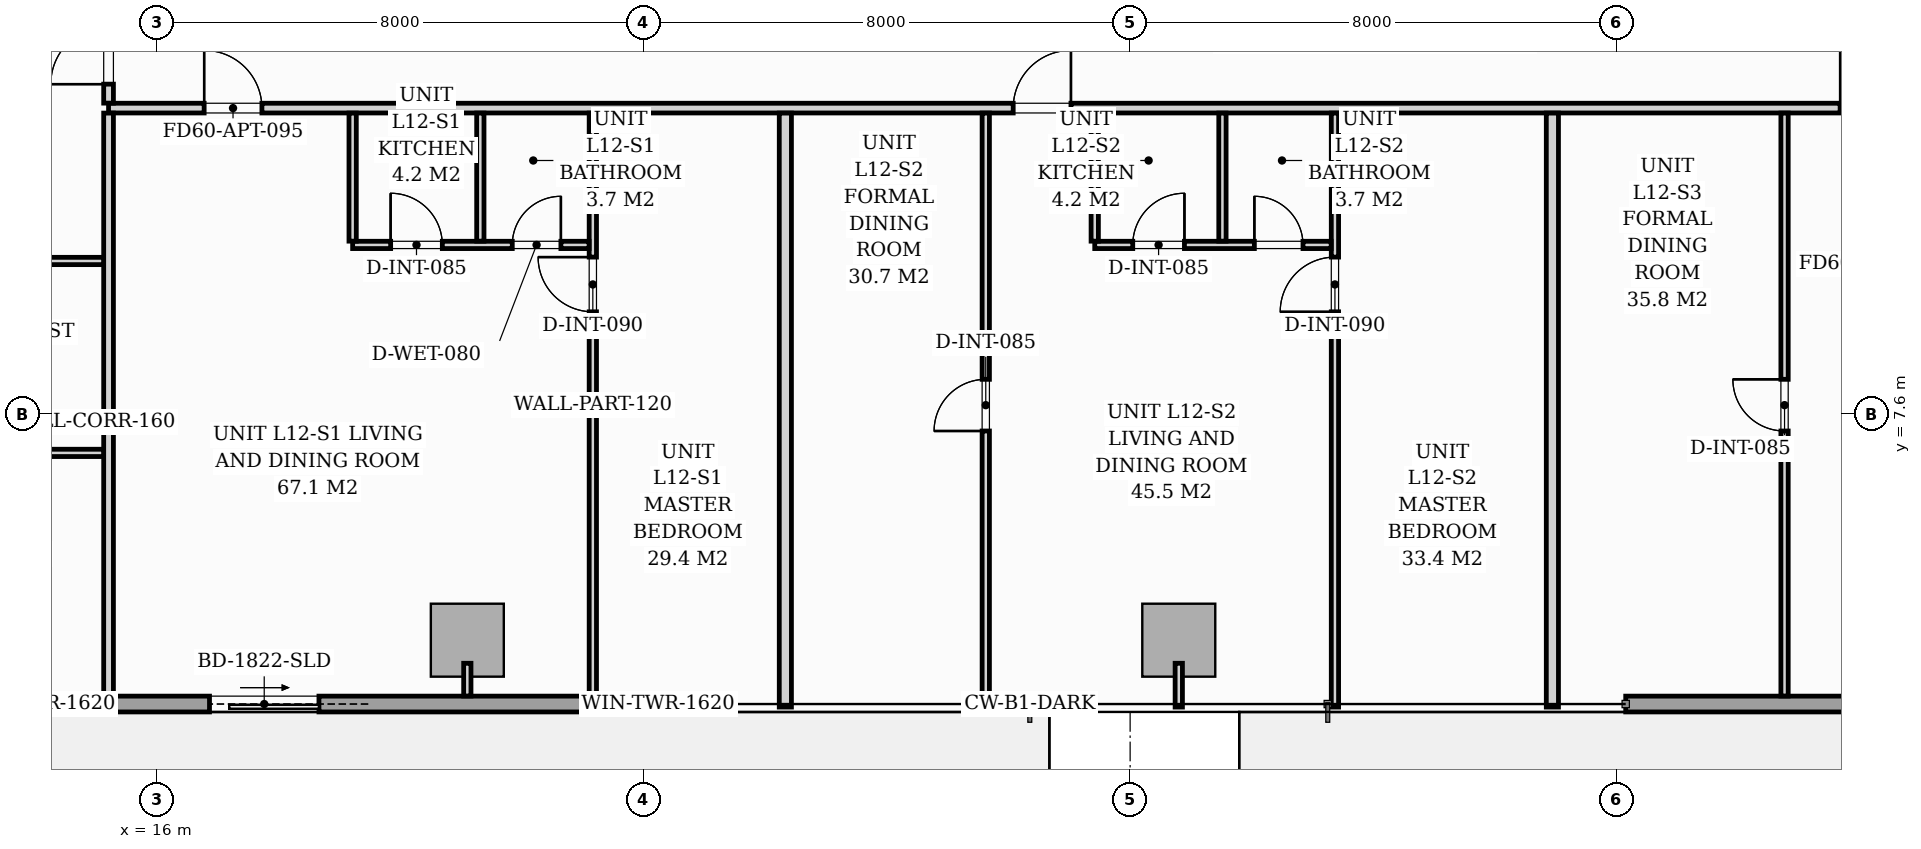
"""IFC4 building model, lengths in metres.
Left out: names, types, materials, properties, quantities, classifications, styles, units other than length and angle.
Written with IfcOpenShell. Run it as: python <this file> out.ifc"""

import sys

from ifc_helpers import new_model, si_unit, direction, frame, frame_2d, origin, origin_2d, place, context, subcontext, project, spatial, rectangle, extrude, source, transform, mapped, element, fill, save


model = new_model("IFC4")
c1 = context("Model", 3, precision=1e-05, world=origin(), true_north=direction((0.0, 1.0)))
c2 = subcontext(c1, "Body", "Model", "MODEL_VIEW")
j1 = project(units=[si_unit("LENGTHUNIT", "METRE"), si_unit("PLANEANGLEUNIT", "RADIAN")], contexts=[c1])
p1 = place(None, origin())
s1 = spatial("IfcSite", under=j1, at=p1, CompositionType="ELEMENT")
p2 = place(p1, origin())
s2 = spatial("IfcBuilding", under=s1, at=p2, CompositionType="ELEMENT")
p3 = place(p2, frame((0.0, 0.0, 45.4)))
s3 = spatial("IfcBuildingStorey", under=s2, at=p3, CompositionType="ELEMENT", Elevation=45.4)
m1 = source(origin(), c2, "Body", "SweptSolid", [
    extrude(rectangle(XDim=1.2, YDim=1.2, at=origin_2d()), origin(), (0.0, 0.0, 1.0), 3.196),
])
for number, where, z_axis, x_axis in (
    (1, (21.1, 3.88, 0.002), (0.0, 0.0, 1.0), (1.0, 0.0, 0.0)),
    (2, (32.8, 3.88, 0.002), (0.0, 0.0, 1.0), (1.0, 0.0, 0.0)),
):
    element("IfcColumn", number, at=place(p3, frame(where, z_axis=z_axis, x_axis=x_axis)), inside=s3, PredefinedType="COLUMN", context=c2, shape_type="MappedRepresentation", body=[
        mapped(m1, transform((0.0, 0.0, 0.0), scale=1.0)),
    ])
p4 = place(p3, frame((57.3, 2.83, 0.0), z_axis=(0.0, 0.0, 1.0), x_axis=(-1.0, 0.0, 0.0)))
e3 = element("IfcWall", 3, at=p4, inside=s3, PredefinedType="STANDARD", context=c2, shape_type="SweptSolid", body=[
    extrude(rectangle(XDim=17.15, YDim=0.26, at=frame_2d((8.575, 0.0))), origin(), (0.0, 0.0, 1.0), 2.94),
])
p5 = place(p4, frame((8.177, 0.0, 0.0)))
e4 = element("IfcOpeningElement", 4, at=p5, cuts=e3, PredefinedType="OPENING", context=c2, shape_type="SweptSolid", body=[
    extrude(rectangle(XDim=1.8, YDim=2.06, at=frame_2d((0.9, 1.03))), frame((0.0, 0.14, 0.0), z_axis=(0.0, -1.0, 0.0), x_axis=(1.0, 0.0, 0.0)), (0.0, 0.0, 1.0), 0.28),
])
p6 = place(p4, frame((2.05, 0.0, 0.65)))
e5 = element("IfcOpeningElement", 5, at=p6, cuts=e3, PredefinedType="OPENING", context=c2, shape_type="SweptSolid", body=[
    extrude(rectangle(XDim=1.6, YDim=1.5, at=frame_2d((0.8, 0.75))), frame((0.0, 0.14, 0.0), z_axis=(0.0, -1.0, 0.0), x_axis=(1.0, 0.0, 0.0)), (0.0, 0.0, 1.0), 0.28),
])
p7 = place(p4, frame((5.644, 0.0, 0.75)))
e6 = element("IfcOpeningElement", 6, at=p7, cuts=e3, PredefinedType="OPENING", context=c2, shape_type="SweptSolid", body=[
    extrude(rectangle(XDim=1.6, YDim=1.5, at=frame_2d((0.8, 0.75))), frame((0.0, 0.14, 0.0), z_axis=(0.0, -1.0, 0.0), x_axis=(1.0, 0.0, 0.0)), (0.0, 0.0, 1.0), 0.28),
])
p8 = place(p3, frame((25.45, 2.83, 0.0), z_axis=(0.0, 0.0, 1.0), x_axis=(-1.0, 0.0, 0.0)))
e7 = element("IfcWall", 7, at=p8, inside=s3, PredefinedType="STANDARD", context=c2, shape_type="SweptSolid", body=[
    extrude(rectangle(XDim=17.15, YDim=0.26, at=frame_2d((8.575, 0.0))), origin(), (0.0, 0.0, 1.0), 2.94),
])
p9 = place(p8, frame((6.79, 0.0, 0.0)))
e8 = element("IfcOpeningElement", 8, at=p9, cuts=e7, PredefinedType="OPENING", context=c2, shape_type="SweptSolid", body=[
    extrude(rectangle(XDim=1.8, YDim=2.06, at=frame_2d((0.9, 1.03))), frame((0.0, 0.14, 0.0), z_axis=(0.0, -1.0, 0.0), x_axis=(1.0, 0.0, 0.0)), (0.0, 0.0, 1.0), 0.28),
])
p10 = place(p8, frame((10.6, 0.0, 0.65)))
e9 = element("IfcOpeningElement", 9, at=p10, cuts=e7, PredefinedType="OPENING", context=c2, shape_type="SweptSolid", body=[
    extrude(rectangle(XDim=1.6, YDim=1.5, at=frame_2d((0.8, 0.75))), frame((0.0, 0.14, 0.0), z_axis=(0.0, -1.0, 0.0), x_axis=(1.0, 0.0, 0.0)), (0.0, 0.0, 1.0), 0.28),
])
p11 = place(p8, frame((0.413, 0.0, 0.75)))
e10 = element("IfcOpeningElement", 10, at=p11, cuts=e7, PredefinedType="OPENING", context=c2, shape_type="SweptSolid", body=[
    extrude(rectangle(XDim=1.6, YDim=1.5, at=frame_2d((0.8, 0.75))), frame((0.0, 0.14, 0.0), z_axis=(0.0, -1.0, 0.0), x_axis=(1.0, 0.0, 0.0)), (0.0, 0.0, 1.0), 0.28),
])
p12 = place(p3, frame((15.2, 12.63, 0.0), z_axis=(0.0, 0.0, 1.0), x_axis=(1.0, 0.0, 0.0)))
e11 = element("IfcWall", 11, at=p12, inside=s3, PredefinedType="PARTITIONING", context=c2, shape_type="SweptSolid", body=[
    extrude(rectangle(XDim=37.1, YDim=0.16, at=frame_2d((18.55, 0.0))), origin(), (0.0, 0.0, 1.0), 2.94),
])
p13 = place(p12, frame((1.572, 0.0, 0.0)))
e12 = element("IfcOpeningElement", 12, at=p13, cuts=e11, PredefinedType="OPENING", context=c2, shape_type="SweptSolid", body=[
    extrude(rectangle(XDim=0.95, YDim=2.06, at=frame_2d((0.475, 1.03))), frame((0.0, 0.09, 0.0), z_axis=(0.0, -1.0, 0.0), x_axis=(1.0, 0.0, 0.0)), (0.0, 0.0, 1.0), 0.18),
])
p14 = place(p12, frame((14.877, 0.0, 0.0)))
e13 = element("IfcOpeningElement", 13, at=p14, cuts=e11, PredefinedType="OPENING", context=c2, shape_type="SweptSolid", body=[
    extrude(rectangle(XDim=0.95, YDim=2.06, at=frame_2d((0.475, 1.03))), frame((0.0, 0.09, 0.0), z_axis=(0.0, -1.0, 0.0), x_axis=(1.0, 0.0, 0.0)), (0.0, 0.0, 1.0), 0.18),
])
p15 = place(p12, frame((28.476, 0.0, 0.0)))
e14 = element("IfcOpeningElement", 14, at=p15, cuts=e11, PredefinedType="OPENING", context=c2, shape_type="SweptSolid", body=[
    extrude(rectangle(XDim=0.95, YDim=2.06, at=frame_2d((0.475, 1.03))), frame((0.0, 0.09, 0.0), z_axis=(0.0, -1.0, 0.0), x_axis=(1.0, 0.0, 0.0)), (0.0, 0.0, 1.0), 0.18),
])
p16 = place(p3, frame((15.2, 2.962, 0.0), z_axis=(0.0, 0.0, 1.0), x_axis=(0.0, 1.0, 0.0)))
e15 = element("IfcWall", 15, at=p16, inside=s3, PredefinedType="PARTITIONING", context=c2, shape_type="SweptSolid", body=[
    extrude(rectangle(XDim=9.586, YDim=0.16, at=frame_2d((4.793, 0.0))), origin(), (0.0, 0.0, 1.0), 2.94),
])
p17 = place(p3, frame((15.2, 12.712, 0.0), z_axis=(0.0, 0.0, 1.0), x_axis=(0.0, 1.0, 0.0)))
e16 = element("IfcWall", 16, at=p17, inside=s3, PredefinedType="PARTITIONING", context=c2, shape_type="SweptSolid", body=[
    extrude(rectangle(XDim=14.726, YDim=0.16, at=frame_2d((7.363, 0.0))), origin(), (0.0, 0.0, 1.0), 2.94),
])
p18 = place(p17, frame((0.312, 0.0, 0.0)))
e17 = element("IfcOpeningElement", 17, at=p18, cuts=e16, PredefinedType="OPENING", context=c2, shape_type="SweptSolid", body=[
    extrude(rectangle(XDim=0.95, YDim=2.06, at=frame_2d((0.475, 1.03))), frame((0.0, 0.09, 0.0), z_axis=(0.0, -1.0, 0.0), x_axis=(1.0, 0.0, 0.0)), (0.0, 0.0, 1.0), 0.18),
])
p19 = place(p3, frame((23.164, 2.962, 0.0), z_axis=(0.0, 0.0, 1.0), x_axis=(0.0, 1.0, 0.0)))
e18 = element("IfcWall", 18, at=p19, inside=s3, PredefinedType="PARTITIONING", context=c2, shape_type="SweptSolid", body=[
    extrude(rectangle(XDim=9.586, YDim=0.12, at=frame_2d((4.793, 0.0))), origin(), (0.0, 0.0, 1.0), 2.94),
])
p20 = place(p19, frame((6.318, 0.0, 0.0)))
e19 = element("IfcOpeningElement", 19, at=p20, cuts=e18, PredefinedType="OPENING", context=c2, shape_type="SweptSolid", body=[
    extrude(rectangle(XDim=0.9, YDim=2.05, at=frame_2d((0.45, 1.025))), frame((0.0, 0.07, 0.0), z_axis=(0.0, -1.0, 0.0), x_axis=(1.0, 0.0, 0.0)), (0.0, 0.0, 1.0), 0.14),
])
p21 = place(p3, frame((19.214, 10.38, 0.0), z_axis=(0.0, 0.0, 1.0), x_axis=(1.0, 0.0, 0.0)))
e20 = element("IfcWall", 20, at=p21, inside=s3, PredefinedType="PARTITIONING", context=c2, shape_type="SweptSolid", body=[
    extrude(rectangle(XDim=3.888, YDim=0.12, at=frame_2d((1.944, 0.0))), origin(), (0.0, 0.0, 1.0), 2.94),
])
p22 = place(p21, frame((0.625, 0.0, 0.0)))
e21 = element("IfcOpeningElement", 21, at=p22, cuts=e20, PredefinedType="OPENING", context=c2, shape_type="SweptSolid", body=[
    extrude(rectangle(XDim=0.85, YDim=2.05, at=frame_2d((0.425, 1.025))), frame((0.0, 0.07, 0.0), z_axis=(0.0, -1.0, 0.0), x_axis=(1.0, 0.0, 0.0)), (0.0, 0.0, 1.0), 0.14),
])
p23 = place(p21, frame((2.625, 0.0, 0.0)))
e22 = element("IfcOpeningElement", 22, at=p23, cuts=e20, PredefinedType="OPENING", context=c2, shape_type="SweptSolid", body=[
    extrude(rectangle(XDim=0.8, YDim=2.02, at=frame_2d((0.4, 1.01))), frame((0.0, 0.07, 0.0), z_axis=(0.0, -1.0, 0.0), x_axis=(1.0, 0.0, 0.0)), (0.0, 0.0, 1.0), 0.14),
])
for number, where, z_axis, x_axis in (
    (23, (21.314, 10.442, 0.0), (0.0, 0.0, 1.0), (0.0, 1.0, 0.0)),
    (24, (19.214, 10.442, 0.0), (0.0, 0.0, 1.0), (0.0, 1.0, 0.0)),
):
    element("IfcWall", number, at=place(p3, frame(where, z_axis=z_axis, x_axis=x_axis)), inside=s3, PredefinedType="PARTITIONING", context=c2, shape_type="SweptSolid", body=[
        extrude(rectangle(XDim=2.106, YDim=0.12, at=frame_2d((1.053, 0.0))), origin(), (0.0, 0.0, 1.0), 2.94),
    ])
p24 = place(p3, frame((26.33, 2.78, 0.0), z_axis=(0.0, 0.0, 1.0), x_axis=(0.0, 1.0, 0.0)))
e25 = element("IfcWall", 25, at=p24, inside=s3, PredefinedType="PARTITIONING", context=c2, shape_type="SweptSolid", body=[
    extrude(rectangle(XDim=9.768, YDim=0.2, at=frame_2d((4.884, 0.0))), origin(), (0.0, 0.0, 1.0), 2.94),
])
p25 = place(p3, frame((35.368, 2.78, 0.0), z_axis=(0.0, 0.0, 1.0), x_axis=(0.0, 1.0, 0.0)))
e26 = element("IfcWall", 26, at=p25, inside=s3, PredefinedType="PARTITIONING", context=c2, shape_type="SweptSolid", body=[
    extrude(rectangle(XDim=9.768, YDim=0.12, at=frame_2d((4.884, 0.0))), origin(), (0.0, 0.0, 1.0), 2.94),
])
p26 = place(p25, frame((6.5, 0.0, 0.0)))
e27 = element("IfcOpeningElement", 27, at=p26, cuts=e26, PredefinedType="OPENING", context=c2, shape_type="SweptSolid", body=[
    extrude(rectangle(XDim=0.9, YDim=2.05, at=frame_2d((0.45, 1.025))), frame((0.0, 0.07, 0.0), z_axis=(0.0, -1.0, 0.0), x_axis=(1.0, 0.0, 0.0)), (0.0, 0.0, 1.0), 0.14),
])
p27 = place(p3, frame((31.418, 10.38, 0.0), z_axis=(0.0, 0.0, 1.0), x_axis=(1.0, 0.0, 0.0)))
e28 = element("IfcWall", 28, at=p27, inside=s3, PredefinedType="PARTITIONING", context=c2, shape_type="SweptSolid", body=[
    extrude(rectangle(XDim=3.888, YDim=0.12, at=frame_2d((1.944, 0.0))), origin(), (0.0, 0.0, 1.0), 2.94),
])
p28 = place(p27, frame((0.625, 0.0, 0.0)))
e29 = element("IfcOpeningElement", 29, at=p28, cuts=e28, PredefinedType="OPENING", context=c2, shape_type="SweptSolid", body=[
    extrude(rectangle(XDim=0.85, YDim=2.05, at=frame_2d((0.425, 1.025))), frame((0.0, 0.07, 0.0), z_axis=(0.0, -1.0, 0.0), x_axis=(1.0, 0.0, 0.0)), (0.0, 0.0, 1.0), 0.14),
])
p29 = place(p27, frame((2.625, 0.0, 0.0)))
e30 = element("IfcOpeningElement", 30, at=p29, cuts=e28, PredefinedType="OPENING", context=c2, shape_type="SweptSolid", body=[
    extrude(rectangle(XDim=0.8, YDim=2.02, at=frame_2d((0.4, 1.01))), frame((0.0, 0.07, 0.0), z_axis=(0.0, -1.0, 0.0), x_axis=(1.0, 0.0, 0.0)), (0.0, 0.0, 1.0), 0.14),
])
for number, where, z_axis, x_axis in (
    (31, (33.518, 10.442, 0.0), (0.0, 0.0, 1.0), (0.0, 1.0, 0.0)),
    (32, (31.418, 10.442, 0.0), (0.0, 0.0, 1.0), (0.0, 1.0, 0.0)),
):
    element("IfcWall", number, at=place(p3, frame(where, z_axis=z_axis, x_axis=x_axis)), inside=s3, PredefinedType="PARTITIONING", context=c2, shape_type="SweptSolid", body=[
        extrude(rectangle(XDim=2.106, YDim=0.12, at=frame_2d((1.053, 0.0))), origin(), (0.0, 0.0, 1.0), 2.94),
    ])
p30 = place(p3, frame((29.626, 2.78, 0.0), z_axis=(0.0, 0.0, 1.0), x_axis=(0.0, 1.0, 0.0)))
e33 = element("IfcWall", 33, at=p30, inside=s3, PredefinedType="PARTITIONING", context=c2, shape_type="SweptSolid", body=[
    extrude(rectangle(XDim=9.768, YDim=0.12, at=frame_2d((4.884, 0.0))), origin(), (0.0, 0.0, 1.0), 2.94),
])
p31 = place(p30, frame((4.54, 0.0, 0.0)))
e34 = element("IfcOpeningElement", 34, at=p31, cuts=e33, PredefinedType="OPENING", context=c2, shape_type="SweptSolid", body=[
    extrude(rectangle(XDim=0.85, YDim=2.05, at=frame_2d((0.425, 1.025))), frame((0.0, 0.07, 0.0), z_axis=(0.0, -1.0, 0.0), x_axis=(1.0, 0.0, 0.0)), (0.0, 0.0, 1.0), 0.14),
])
p32 = place(p3, frame((38.944, 2.78, 0.0), z_axis=(0.0, 0.0, 1.0), x_axis=(0.0, 1.0, 0.0)))
e35 = element("IfcWall", 35, at=p32, inside=s3, PredefinedType="PARTITIONING", context=c2, shape_type="SweptSolid", body=[
    extrude(rectangle(XDim=9.768, YDim=0.2, at=frame_2d((4.884, 0.0))), origin(), (0.0, 0.0, 1.0), 2.94),
])
p33 = place(p3, frame((42.762, 2.962, 0.0), z_axis=(0.0, 0.0, 1.0), x_axis=(0.0, 1.0, 0.0)))
e36 = element("IfcWall", 36, at=p33, inside=s3, PredefinedType="PARTITIONING", context=c2, shape_type="SweptSolid", body=[
    extrude(rectangle(XDim=9.586, YDim=0.12, at=frame_2d((4.793, 0.0))), origin(), (0.0, 0.0, 1.0), 2.94),
])
p34 = place(p33, frame((4.358, 0.0, 0.0)))
e37 = element("IfcOpeningElement", 37, at=p34, cuts=e36, PredefinedType="OPENING", context=c2, shape_type="SweptSolid", body=[
    extrude(rectangle(XDim=0.85, YDim=2.05, at=frame_2d((0.425, 1.025))), frame((0.0, 0.07, 0.0), z_axis=(0.0, -1.0, 0.0), x_axis=(1.0, 0.0, 0.0)), (0.0, 0.0, 1.0), 0.14),
])
p35 = place(p3, frame((5.88, 6.96, 0.0), z_axis=(0.0, 0.0, 1.0), x_axis=(1.0, 0.0, 0.0)))
e38 = element("IfcWall", 38, at=p35, inside=s3, PredefinedType="PARTITIONING", context=c2, shape_type="SweptSolid", body=[
    extrude(rectangle(XDim=9.238, YDim=0.12, at=frame_2d((4.619, 0.0))), origin(), (0.0, 0.0, 1.0), 2.94),
])
p36 = place(p35, frame((4.185, 0.0, 0.0)))
e39 = element("IfcOpeningElement", 39, at=p36, cuts=e38, PredefinedType="OPENING", context=c2, shape_type="SweptSolid", body=[
    extrude(rectangle(XDim=0.85, YDim=2.05, at=frame_2d((0.425, 1.025))), frame((0.0, 0.07, 0.0), z_axis=(0.0, -1.0, 0.0), x_axis=(1.0, 0.0, 0.0)), (0.0, 0.0, 1.0), 0.14),
])
p37 = place(p3, frame((5.88, 10.116, 0.0), z_axis=(0.0, 0.0, 1.0), x_axis=(1.0, 0.0, 0.0)))
e40 = element("IfcWall", 40, at=p37, inside=s3, PredefinedType="PARTITIONING", context=c2, shape_type="SweptSolid", body=[
    extrude(rectangle(XDim=9.238, YDim=0.12, at=frame_2d((4.619, 0.0))), origin(), (0.0, 0.0, 1.0), 2.94),
])
p38 = place(p37, frame((4.185, 0.0, 0.0)))
e41 = element("IfcOpeningElement", 41, at=p38, cuts=e40, PredefinedType="OPENING", context=c2, shape_type="SweptSolid", body=[
    extrude(rectangle(XDim=0.85, YDim=2.05, at=frame_2d((0.425, 1.025))), frame((0.0, 0.07, 0.0), z_axis=(0.0, -1.0, 0.0), x_axis=(1.0, 0.0, 0.0)), (0.0, 0.0, 1.0), 0.14),
])
p39 = place(p3, frame((21.1, 3.5, 0.0), z_axis=(0.0, 0.0, 1.0), x_axis=(0.0, -1.0, 0.0)))
e42 = element("IfcWall", 42, at=p39, inside=s3, PredefinedType="PARTITIONING", context=c2, shape_type="SweptSolid", body=[
    extrude(rectangle(XDim=0.538, YDim=0.12, at=frame_2d((0.269, 0.0))), origin(), (0.0, 0.0, 1.0), 2.94),
])
p40 = place(p3, frame((32.8, 3.5, 0.0), z_axis=(0.0, 0.0, 1.0), x_axis=(0.0, -1.0, 0.0)))
e43 = element("IfcWall", 43, at=p40, inside=s3, PredefinedType="PARTITIONING", context=c2, shape_type="SweptSolid", body=[
    extrude(rectangle(XDim=0.72, YDim=0.12, at=frame_2d((0.36, 0.0))), origin(), (0.0, 0.0, 1.0), 2.94),
])
m2 = source(origin(), c2, "Body", "SweptSolid", [
    extrude(rectangle(XDim=1.8, YDim=2.06, at=frame_2d((0.9, 1.03))), frame((0.0, 0.025, 0.0), z_axis=(0.0, -1.0, 0.0), x_axis=(1.0, 0.0, 0.0)), (0.0, 0.0, 1.0), 0.05),
])
p41 = place(p9, origin())
e44 = element("IfcDoor", 44, at=p41, inside=s3, OperationType="SLIDING_TO_LEFT", PredefinedType="DOOR", context=c2, shape_type="MappedRepresentation", body=[
    mapped(m2, transform((0.0, 0.0, 0.0), scale=1.0)),
])
fill(e8, e44)
m3 = source(origin(), c2, "Body", "SweptSolid", [
    extrude(rectangle(XDim=1.6, YDim=1.5, at=frame_2d((0.8, 0.75))), frame((0.0, 0.03, 0.0), z_axis=(0.0, -1.0, 0.0), x_axis=(1.0, 0.0, 0.0)), (0.0, 0.0, 1.0), 0.06),
])
p42 = place(p10, origin())
e45 = element("IfcWindow", 45, at=p42, inside=s3, PartitioningType="SINGLE_PANEL", PredefinedType="WINDOW", context=c2, shape_type="MappedRepresentation", body=[
    mapped(m3, transform((0.0, 0.0, 0.0), scale=1.0)),
])
fill(e9, e45)
p43 = place(p11, origin())
e46 = element("IfcWindow", 46, at=p43, inside=s3, PartitioningType="SINGLE_PANEL", PredefinedType="WINDOW", context=c2, shape_type="MappedRepresentation", body=[
    mapped(m3, transform((0.0, 0.0, 0.0), scale=1.0)),
])
fill(e10, e46)
m4 = source(origin(), c2, "Body", "SweptSolid", [
    extrude(rectangle(XDim=0.95, YDim=2.06, at=frame_2d((0.475, 1.03))), frame((0.0, 0.025, 0.0), z_axis=(0.0, -1.0, 0.0), x_axis=(1.0, 0.0, 0.0)), (0.0, 0.0, 1.0), 0.05),
])
p44 = place(p13, origin())
e47 = element("IfcDoor", 47, at=p44, inside=s3, OperationType="SINGLE_SWING_LEFT", PredefinedType="DOOR", context=c2, shape_type="MappedRepresentation", body=[
    mapped(m4, transform((0.0, 0.0, 0.0), scale=1.0)),
])
fill(e12, e47)
m5 = source(origin(), c2, "Body", "SweptSolid", [
    extrude(rectangle(XDim=0.9, YDim=2.05, at=frame_2d((0.45, 1.025))), frame((0.0, 0.025, 0.0), z_axis=(0.0, -1.0, 0.0), x_axis=(1.0, 0.0, 0.0)), (0.0, 0.0, 1.0), 0.05),
])
p45 = place(p20, origin())
e48 = element("IfcDoor", 48, at=p45, inside=s3, OperationType="SINGLE_SWING_RIGHT", PredefinedType="DOOR", context=c2, shape_type="MappedRepresentation", body=[
    mapped(m5, transform((0.0, 0.0, 0.0), scale=1.0)),
])
fill(e19, e48)
m6 = source(origin(), c2, "Body", "SweptSolid", [
    extrude(rectangle(XDim=0.85, YDim=2.05, at=frame_2d((0.425, 1.025))), frame((0.0, 0.025, 0.0), z_axis=(0.0, -1.0, 0.0), x_axis=(1.0, 0.0, 0.0)), (0.0, 0.0, 1.0), 0.05),
])
p46 = place(p22, origin())
e49 = element("IfcDoor", 49, at=p46, inside=s3, OperationType="SINGLE_SWING_LEFT", PredefinedType="DOOR", context=c2, shape_type="MappedRepresentation", body=[
    mapped(m6, transform((0.0, 0.0, 0.0), scale=1.0)),
])
fill(e21, e49)
m7 = source(origin(), c2, "Body", "SweptSolid", [
    extrude(rectangle(XDim=0.8, YDim=2.02, at=frame_2d((0.4, 1.01))), frame((0.0, 0.025, 0.0), z_axis=(0.0, -1.0, 0.0), x_axis=(1.0, 0.0, 0.0)), (0.0, 0.0, 1.0), 0.05),
])
p47 = place(p23, origin())
e50 = element("IfcDoor", 50, at=p47, inside=s3, OperationType="SINGLE_SWING_RIGHT", PredefinedType="DOOR", context=c2, shape_type="MappedRepresentation", body=[
    mapped(m7, transform((0.0, 0.0, 0.0), scale=1.0)),
])
fill(e22, e50)
p48 = place(p31, origin())
e51 = element("IfcDoor", 51, at=p48, inside=s3, OperationType="SINGLE_SWING_LEFT", PredefinedType="DOOR", context=c2, shape_type="MappedRepresentation", body=[
    mapped(m6, transform((0.0, 0.0, 0.0), scale=1.0)),
])
fill(e34, e51)
p49 = place(p14, origin())
e52 = element("IfcDoor", 52, at=p49, inside=s3, OperationType="SINGLE_SWING_RIGHT", PredefinedType="DOOR", context=c2, shape_type="MappedRepresentation", body=[
    mapped(m4, transform((0.0, 0.0, 0.0), scale=1.0)),
])
fill(e13, e52)
p50 = place(p26, origin())
e53 = element("IfcDoor", 53, at=p50, inside=s3, OperationType="SINGLE_SWING_LEFT", PredefinedType="DOOR", context=c2, shape_type="MappedRepresentation", body=[
    mapped(m5, transform((0.0, 0.0, 0.0), scale=1.0)),
])
fill(e27, e53)
p51 = place(p28, origin())
e54 = element("IfcDoor", 54, at=p51, inside=s3, OperationType="SINGLE_SWING_RIGHT", PredefinedType="DOOR", context=c2, shape_type="MappedRepresentation", body=[
    mapped(m6, transform((0.0, 0.0, 0.0), scale=1.0)),
])
fill(e29, e54)
p52 = place(p29, origin())
e55 = element("IfcDoor", 55, at=p52, inside=s3, OperationType="SINGLE_SWING_LEFT", PredefinedType="DOOR", context=c2, shape_type="MappedRepresentation", body=[
    mapped(m7, transform((0.0, 0.0, 0.0), scale=1.0)),
])
fill(e30, e55)
p53 = place(p34, origin())
e56 = element("IfcDoor", 56, at=p53, inside=s3, OperationType="SINGLE_SWING_RIGHT", PredefinedType="DOOR", context=c2, shape_type="MappedRepresentation", body=[
    mapped(m6, transform((0.0, 0.0, 0.0), scale=1.0)),
])
fill(e37, e56)
p54 = place(p15, origin())
e57 = element("IfcDoor", 57, at=p54, inside=s3, OperationType="SINGLE_SWING_LEFT", PredefinedType="DOOR", context=c2, shape_type="MappedRepresentation", body=[
    mapped(m4, transform((0.0, 0.0, 0.0), scale=1.0)),
])
fill(e14, e57)
p55 = place(p18, origin())
e58 = element("IfcDoor", 58, at=p55, inside=s3, OperationType="SINGLE_SWING_LEFT", PredefinedType="DOOR", context=c2, shape_type="MappedRepresentation", body=[
    mapped(m4, transform((0.0, 0.0, 0.0), scale=1.0)),
])
fill(e17, e58)
save(model, sys.argv[1])
